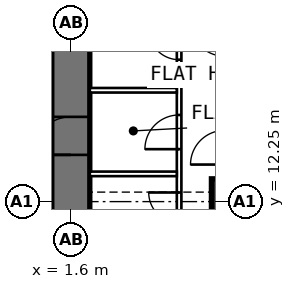
"""IFC4 building model, lengths in metres.
Left out: names, types, materials, properties, quantities, classifications, styles, units other than length and angle.
Written with IfcOpenShell. Run it as: python <this file> out.ifc"""

import sys

from ifc_helpers import new_model, si_unit, direction, frame, frame_2d, origin, origin_2d, place, context, subcontext, project, spatial, rectangle, extrude, element, fill, save


model = new_model("IFC4")
c1 = context("Model", 3, precision=1e-05, world=origin(), true_north=direction((0.0, 1.0)))
c2 = subcontext(c1, "Body", "Model", "MODEL_VIEW")
j1 = project(units=[si_unit("LENGTHUNIT", "METRE"), si_unit("PLANEANGLEUNIT", "RADIAN")], contexts=[c1])
p1 = place(None, origin())
s1 = spatial("IfcSite", under=j1, at=p1, CompositionType="ELEMENT")
p2 = place(p1, origin())
s2 = spatial("IfcBuilding", under=s1, at=p2, CompositionType="ELEMENT")
p3 = place(p2, frame((0.0, 0.0, 84.4)))
s3 = spatial("IfcBuildingStorey", under=s2, at=p3, CompositionType="ELEMENT", Elevation=84.4)
p4 = place(p3, frame((5.9, 12.25, 0.0), z_axis=(0.0, 0.0, 1.0), x_axis=(0.0, 1.0, 0.0)))
e1 = element("IfcColumn", 1, at=p4, inside=s3, PredefinedType="COLUMN", context=c2, shape_type="SweptSolid", body=[
    extrude(rectangle(XDim=1.2, YDim=1.2, at=origin_2d()), origin(), (0.0, 0.0, 1.0), 3.6),
])
p5 = place(p3, frame((1.6, 9.6, 0.0), z_axis=(0.0, 0.0, 1.0), x_axis=(0.0, 1.0, 0.0)))
e2 = element("IfcWall", 2, at=p5, inside=s3, PredefinedType="SHEAR", context=c2, shape_type="SweptSolid", body=[
    extrude(rectangle(XDim=8.35, YDim=1.0, at=frame_2d((4.175, 0.0))), origin(), (0.0, 0.0, 1.0), 3.6),
])
p6 = place(p5, frame((3.88, 0.0, 0.0)))
e3 = element("IfcOpeningElement", 3, at=p6, cuts=e2, PredefinedType="OPENING", context=c2, shape_type="SweptSolid", body=[
    extrude(rectangle(XDim=1.0, YDim=2.1, at=frame_2d((0.5, 1.05))), frame((0.0, 0.512, 0.0), z_axis=(0.0, -1.0, 0.0), x_axis=(1.0, 0.0, 0.0)), (0.0, 0.0, 1.0), 1.024),
])
p7 = place(p3, frame((4.45, 10.1, 0.0), z_axis=(0.0, 0.0, 1.0), x_axis=(0.0, 1.0, 0.0)))
e4 = element("IfcWall", 4, at=p7, inside=s3, PredefinedType="PARTITIONING", context=c2, shape_type="SweptSolid", body=[
    extrude(rectangle(XDim=10.6, YDim=0.12, at=frame_2d((5.3, 0.0))), origin(), (0.0, 0.0, 1.0), 3.35),
])
p8 = place(p7, frame((1.59, 0.0, 0.0)))
e5 = element("IfcOpeningElement", 5, at=p8, cuts=e4, PredefinedType="OPENING", context=c2, shape_type="SweptSolid", body=[
    extrude(rectangle(XDim=0.8, YDim=2.1, at=frame_2d((0.4, 1.05))), frame((0.0, 0.072, 0.0), z_axis=(0.0, -1.0, 0.0), x_axis=(1.0, 0.0, 0.0)), (0.0, 0.0, 1.0), 0.144),
])
p9 = place(p7, frame((3.53, 0.0, 0.0)))
e6 = element("IfcOpeningElement", 6, at=p9, cuts=e4, PredefinedType="OPENING", context=c2, shape_type="SweptSolid", body=[
    extrude(rectangle(XDim=0.9, YDim=2.1, at=frame_2d((0.45, 1.05))), frame((0.0, 0.072, 0.0), z_axis=(0.0, -1.0, 0.0), x_axis=(1.0, 0.0, 0.0)), (0.0, 0.0, 1.0), 0.144),
])
p10 = place(p7, frame((5.884, 0.0, 0.0)))
e7 = element("IfcOpeningElement", 7, at=p10, cuts=e4, PredefinedType="OPENING", context=c2, shape_type="SweptSolid", body=[
    extrude(rectangle(XDim=0.8, YDim=2.1, at=frame_2d((0.4, 1.05))), frame((0.0, 0.072, 0.0), z_axis=(0.0, -1.0, 0.0), x_axis=(1.0, 0.0, 0.0)), (0.0, 0.0, 1.0), 0.144),
])
p11 = place(p7, frame((7.842, 0.0, 0.0)))
e8 = element("IfcOpeningElement", 8, at=p11, cuts=e4, PredefinedType="OPENING", context=c2, shape_type="SweptSolid", body=[
    extrude(rectangle(XDim=0.9, YDim=2.1, at=frame_2d((0.45, 1.05))), frame((0.0, 0.072, 0.0), z_axis=(0.0, -1.0, 0.0), x_axis=(1.0, 0.0, 0.0)), (0.0, 0.0, 1.0), 0.144),
])
p12 = place(p7, frame((9.497, 0.0, 0.0)))
e9 = element("IfcOpeningElement", 9, at=p12, cuts=e4, PredefinedType="OPENING", context=c2, shape_type="SweptSolid", body=[
    extrude(rectangle(XDim=0.8, YDim=2.1, at=frame_2d((0.4, 1.05))), frame((0.0, 0.072, 0.0), z_axis=(0.0, -1.0, 0.0), x_axis=(1.0, 0.0, 0.0)), (0.0, 0.0, 1.0), 0.144),
])
for number, where, z_axis, x_axis in (
    (10, (2.1, 12.98, 0.0), (0.0, 0.0, 1.0), (1.0, 0.0, 0.0)),
    (11, (2.1, 15.18, 0.0), (0.0, 0.0, 1.0), (1.0, 0.0, 0.0)),
):
    element("IfcWall", number, at=place(p3, frame(where, z_axis=z_axis, x_axis=x_axis)), inside=s3, PredefinedType="PARTITIONING", context=c2, shape_type="SweptSolid", body=[
        extrude(rectangle(XDim=2.29, YDim=0.12, at=frame_2d((1.145, 0.0))), origin(), (0.0, 0.0, 1.0), 3.35),
    ])
p13 = place(p6, origin())
e12 = element("IfcDoor", 12, at=p13, inside=s3, OperationType="SINGLE_SWING_LEFT", PredefinedType="DOOR", context=c2, shape_type="SweptSolid", body=[
    extrude(rectangle(XDim=1.0, YDim=2.1, at=frame_2d((0.5, 1.05))), frame((0.0, 0.25, 0.0), z_axis=(0.0, -1.0, 0.0), x_axis=(1.0, 0.0, 0.0)), (0.0, 0.0, 1.0), 0.5),
])
fill(e3, e12)
p14 = place(p8, origin())
e13 = element("IfcDoor", 13, at=p14, inside=s3, OperationType="SINGLE_SWING_RIGHT", PredefinedType="DOOR", context=c2, shape_type="SweptSolid", body=[
    extrude(rectangle(XDim=0.8, YDim=2.1, at=frame_2d((0.4, 1.05))), frame((0.0, 0.025, 0.0), z_axis=(0.0, -1.0, 0.0), x_axis=(1.0, 0.0, 0.0)), (0.0, 0.0, 1.0), 0.05),
])
fill(e5, e13)
p15 = place(p9, origin())
e14 = element("IfcDoor", 14, at=p15, inside=s3, OperationType="SINGLE_SWING_LEFT", PredefinedType="DOOR", context=c2, shape_type="SweptSolid", body=[
    extrude(rectangle(XDim=0.9, YDim=2.1, at=frame_2d((0.45, 1.05))), frame((0.0, 0.025, 0.0), z_axis=(0.0, -1.0, 0.0), x_axis=(1.0, 0.0, 0.0)), (0.0, 0.0, 1.0), 0.05),
])
fill(e6, e14)
p16 = place(p10, origin())
e15 = element("IfcDoor", 15, at=p16, inside=s3, OperationType="SINGLE_SWING_RIGHT", PredefinedType="DOOR", context=c2, shape_type="SweptSolid", body=[
    extrude(rectangle(XDim=0.8, YDim=2.1, at=frame_2d((0.4, 1.05))), frame((0.0, 0.025, 0.0), z_axis=(0.0, -1.0, 0.0), x_axis=(1.0, 0.0, 0.0)), (0.0, 0.0, 1.0), 0.05),
])
fill(e7, e15)
save(model, sys.argv[1])
